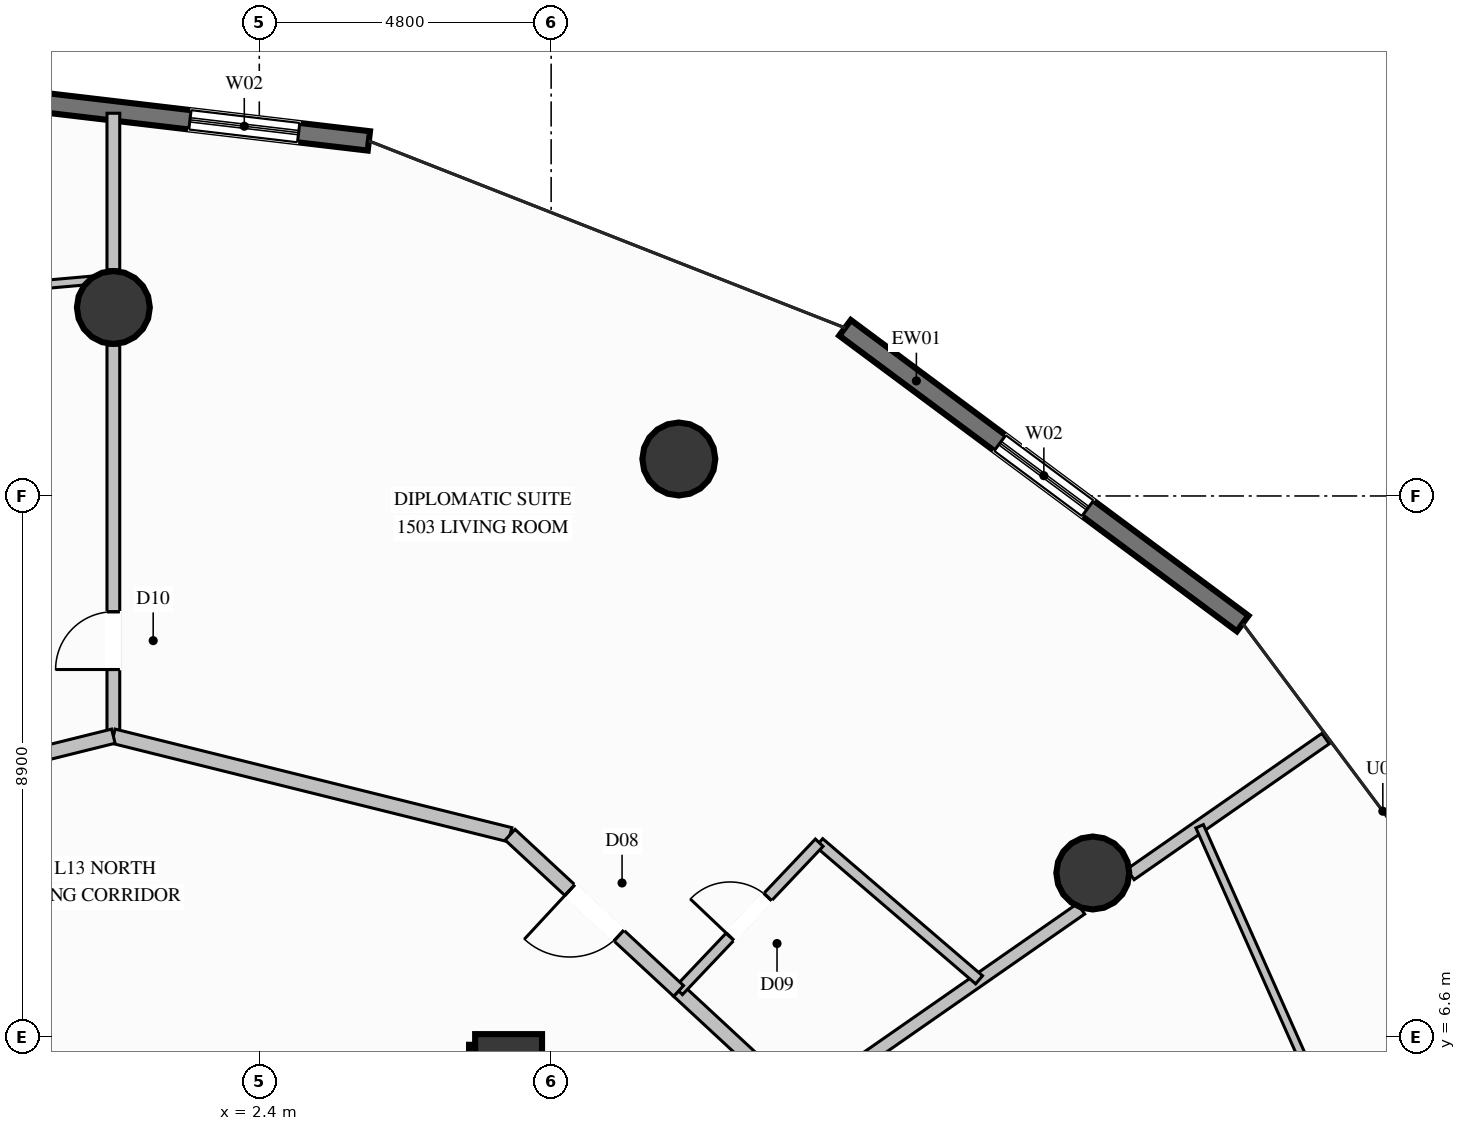
"""IFC4 building model, lengths in metres.
Left out: names, types, materials, properties, quantities, classifications, styles, units other than length and angle.
Written with IfcOpenShell. Run it as: python <this file> out.ifc"""

import sys

from ifc_helpers import new_model, si_unit, direction, frame, frame_2d, origin, origin_2d, place, context, subcontext, project, spatial, rectangle, circle, extrude, element, fill, save


model = new_model("IFC4")
c1 = context("Model", 3, precision=1e-05, world=origin(), true_north=direction((0.0, 1.0)))
c2 = subcontext(c1, "Body", "Model", "MODEL_VIEW")
j1 = project(units=[si_unit("LENGTHUNIT", "METRE"), si_unit("PLANEANGLEUNIT", "RADIAN")], contexts=[c1])
p1 = place(None, origin())
s1 = spatial("IfcSite", under=j1, at=p1, CompositionType="ELEMENT")
p2 = place(p1, origin())
s2 = spatial("IfcBuilding", under=s1, at=p2, CompositionType="ELEMENT")
p3 = place(p2, frame((0.0, 0.0, 57.2)))
s3 = spatial("IfcBuildingStorey", under=s2, at=p3, CompositionType="ELEMENT", Elevation=57.2)
p4 = place(p3, frame((6.5, 6.1, 0.0), z_axis=(0.0, 0.0, 1.0), x_axis=(1.0, 0.0, 0.0)))
e1 = element("IfcColumn", 1, at=p4, inside=s3, PredefinedType="COLUMN", context=c2, shape_type="SweptSolid", body=[
    extrude(rectangle(XDim=1.1, YDim=1.1, at=origin_2d()), origin(), (0.0, 0.0, 1.0), 3.6),
])
p5 = place(p3, frame((5.85, 6.1, 0.0), z_axis=(0.0, 0.0, 1.0), x_axis=(1.0, 0.0, 0.0)))
e2 = element("IfcWall", 2, at=p5, inside=s3, PredefinedType="SHEAR", context=c2, shape_type="SweptSolid", body=[
    extrude(rectangle(XDim=0.275, YDim=0.75, at=frame_2d((0.137, 0.0))), origin(), (0.0, 0.0, 1.0), 3.6),
])
p6 = place(p3, frame((6.5, 3.35, 0.0), z_axis=(0.0, 0.0, 1.0), x_axis=(0.0, 1.0, 0.0)))
e3 = element("IfcWall", 3, at=p6, inside=s3, PredefinedType="SHEAR", context=c2, shape_type="SweptSolid", body=[
    extrude(rectangle(XDim=3.125, YDim=0.75, at=frame_2d((1.562, 0.0))), origin(), (0.0, 0.0, 1.0), 3.6),
])
for number, where, z_axis, x_axis in (
    (4, (16.108, 9.3, 0.0), (0.0, 0.0, 1.0), (1.0, 0.0, 0.0)),
    (5, (9.3, 16.108, 0.0), (0.0, 0.0, 1.0), (1.0, 0.0, 0.0)),
    (6, (0.0, 18.6, 0.0), (0.0, 0.0, 1.0), (1.0, 0.0, 0.0)),
):
    element("IfcColumn", number, at=place(p3, frame(where, z_axis=z_axis, x_axis=x_axis)), inside=s3, PredefinedType="COLUMN", context=c2, shape_type="SweptSolid", body=[
        extrude(circle(Radius=0.6, at=origin_2d()), origin(), (0.0, 0.0, 1.0), 3.6),
    ])
p7 = place(p3, frame((12.033, 18.265, 0.0), z_axis=(0.0, 0.0, 1.0), x_axis=(0.802538106816, -0.596600860801, 0.0)))
e7 = element("IfcWall", 7, at=p7, inside=s3, PredefinedType="SOLIDWALL", context=c2, shape_type="SweptSolid", body=[
    extrude(rectangle(XDim=8.149, YDim=0.32, at=frame_2d((4.075, 0.0))), origin(), (0.0, 0.0, 1.0), 3.34),
])
p8 = place(p7, frame((3.175, 0.0, 0.35)))
e8 = element("IfcOpeningElement", 8, at=p8, cuts=e7, PredefinedType="OPENING", context=c2, shape_type="SweptSolid", body=[
    extrude(rectangle(XDim=1.8, YDim=2.6, at=frame_2d((0.9, 1.3))), frame((0.0, 0.17, 0.0), z_axis=(0.0, -1.0, 0.0), x_axis=(1.0, 0.0, 0.0)), (0.0, 0.0, 1.0), 0.34),
])
p9 = place(p3, frame((-4.153, 22.324, 0.0), z_axis=(0.0, 0.0, 1.0), x_axis=(0.993124034761, -0.117066867986, 0.0)))
e9 = element("IfcWall", 9, at=p9, inside=s3, PredefinedType="SOLIDWALL", context=c2, shape_type="SweptSolid", body=[
    extrude(rectangle(XDim=8.413, YDim=0.32, at=frame_2d((4.207, 0.0))), origin(), (0.0, 0.0, 1.0), 3.34),
])
p10 = place(p9, frame((5.45, 0.0, 0.35)))
e10 = element("IfcOpeningElement", 10, at=p10, cuts=e9, PredefinedType="OPENING", context=c2, shape_type="SweptSolid", body=[
    extrude(rectangle(XDim=1.8, YDim=2.6, at=frame_2d((0.9, 1.3))), frame((0.0, 0.17, 0.0), z_axis=(0.0, -1.0, 0.0), x_axis=(1.0, 0.0, 0.0)), (0.0, 0.0, 1.0), 0.34),
])
p11 = place(p3, frame((11.302, 5.5, 0.0), z_axis=(0.0, 0.0, 1.0), x_axis=(0.82074934999, 0.571288459967, 0.0)))
e11 = element("IfcWall", 11, at=p11, inside=s3, PredefinedType="PARTITIONING", context=c2, shape_type="SweptSolid", body=[
    extrude(rectangle(XDim=5.621, YDim=0.21, at=frame_2d((2.81, 0.0))), origin(), (0.0, 0.0, 1.0), 2.707),
])
p12 = place(p3, frame((16.728, 9.276, 0.0), z_axis=(0.0, 0.0, 1.0), x_axis=(0.820690069196, 0.571373617104, 0.0)))
e12 = element("IfcWall", 12, at=p12, inside=s3, PredefinedType="PARTITIONING", context=c2, shape_type="SweptSolid", body=[
    extrude(rectangle(XDim=3.91, YDim=0.21, at=frame_2d((1.955, 0.0))), origin(), (0.0, 0.0, 1.0), 3.34),
])
p13 = place(p3, frame((0.0, 11.55, 0.0), z_axis=(0.0, 0.0, 1.0), x_axis=(0.0, 1.0, 0.0)))
e13 = element("IfcWall", 13, at=p13, inside=s3, PredefinedType="PARTITIONING", context=c2, shape_type="SweptSolid", body=[
    extrude(rectangle(XDim=6.43, YDim=0.21, at=frame_2d((3.215, 0.0))), origin(), (0.0, 0.0, 1.0), 2.707),
])
p14 = place(p13, frame((1.096, 0.0, 0.0)))
e14 = element("IfcOpeningElement", 14, at=p14, cuts=e13, PredefinedType="OPENING", context=c2, shape_type="SweptSolid", body=[
    extrude(rectangle(XDim=0.95, YDim=2.1, at=frame_2d((0.475, 1.05))), frame((0.0, 0.115, 0.0), z_axis=(0.0, -1.0, 0.0), x_axis=(1.0, 0.0, 0.0)), (0.0, 0.0, 1.0), 0.23),
])
p15 = place(p3, frame((0.0, 19.22, 0.0), z_axis=(0.0, 0.0, 1.0), x_axis=(0.0, 1.0, 0.0)))
e15 = element("IfcWall", 15, at=p15, inside=s3, PredefinedType="PARTITIONING", context=c2, shape_type="SweptSolid", body=[
    extrude(rectangle(XDim=2.574, YDim=0.21, at=frame_2d((1.287, 0.0))), origin(), (0.0, 0.0, 1.0), 3.34),
])
p16 = place(p3, frame((22.4, -0.132, 0.0), z_axis=(0.0, 0.0, 1.0), x_axis=(-0.406250071735, 0.913761937933, 0.0)))
e16 = element("IfcWall", 16, at=p16, inside=s3, PredefinedType="PARTITIONING", context=c2, shape_type="SweptSolid", body=[
    extrude(rectangle(XDim=11.163, YDim=0.135, at=frame_2d((5.582, 0.0))), origin(), (0.0, 0.0, 1.0), 3.34),
])
p17 = place(p16, frame((5.106, 0.0, 0.0)))
e17 = element("IfcOpeningElement", 17, at=p17, cuts=e16, PredefinedType="OPENING", context=c2, shape_type="SweptSolid", body=[
    extrude(rectangle(XDim=0.95, YDim=2.1, at=frame_2d((0.475, 1.05))), frame((0.0, 0.078, 0.0), z_axis=(0.0, -1.0, 0.0), x_axis=(1.0, 0.0, 0.0)), (0.0, 0.0, 1.0), 0.155),
])
p18 = place(p3, frame((11.302, 5.5, 0.0), z_axis=(0.0, 0.0, 1.0), x_axis=(-0.73328595385, 0.679920370254, 0.0)))
e18 = element("IfcWall", 18, at=p18, inside=s3, PredefinedType="PARTITIONING", context=c2, shape_type="SweptSolid", body=[
    extrude(rectangle(XDim=2.736, YDim=0.24, at=frame_2d((1.368, 0.0))), origin(), (0.0, 0.0, 1.0), 3.34),
])
p19 = place(p3, frame((14.238, 7.543, 0.0), z_axis=(0.0, 0.0, 1.0), x_axis=(-0.759032669892, 0.651052537078, 0.0)))
e19 = element("IfcWall", 19, at=p19, inside=s3, PredefinedType="PLUMBINGWALL", context=c2, shape_type="SweptSolid", body=[
    extrude(rectangle(XDim=3.464, YDim=0.175, at=frame_2d((1.732, 0.0))), origin(), (0.0, 0.0, 1.0), 3.34),
])
p20 = place(p3, frame((9.296, 7.36, 0.0), z_axis=(0.0, 0.0, 1.0), x_axis=(0.688264353377, 0.725459978132, 0.0)))
e20 = element("IfcWall", 20, at=p20, inside=s3, PredefinedType="PLUMBINGWALL", context=c2, shape_type="SweptSolid", body=[
    extrude(rectangle(XDim=3.361, YDim=0.175, at=frame_2d((1.68, 0.0))), origin(), (0.0, 0.0, 1.0), 2.707),
])
p21 = place(p20, frame((1.23, 0.0, 0.0)))
e21 = element("IfcOpeningElement", 21, at=p21, cuts=e20, PredefinedType="OPENING", context=c2, shape_type="SweptSolid", body=[
    extrude(rectangle(XDim=0.9, YDim=2.1, at=frame_2d((0.45, 1.05))), frame((0.0, 0.098, 0.0), z_axis=(0.0, -1.0, 0.0), x_axis=(1.0, 0.0, 0.0)), (0.0, 0.0, 1.0), 0.195),
])
p22 = place(p3, frame((6.525, 9.929, 0.0), z_axis=(0.0, 0.0, 1.0), x_axis=(-0.970496047219, 0.241117030365, 0.0)))
e22 = element("IfcWall", 22, at=p22, inside=s3, PredefinedType="PARTITIONING", context=c2, shape_type="SweptSolid", body=[
    extrude(rectangle(XDim=6.723, YDim=0.24, at=frame_2d((3.362, 0.0))), origin(), (0.0, 0.0, 1.0), 2.919),
])
p23 = place(p3, frame((9.296, 7.36, 0.0), z_axis=(0.0, 0.0, 1.0), x_axis=(-0.733350151535, 0.679851127265, 0.0)))
e23 = element("IfcWall", 23, at=p23, inside=s3, PredefinedType="PARTITIONING", context=c2, shape_type="SweptSolid", body=[
    extrude(rectangle(XDim=3.779, YDim=0.24, at=frame_2d((1.889, 0.0))), origin(), (0.0, 0.0, 1.0), 3.34),
])
p24 = place(p23, frame((1.339, 0.0, 0.0)))
e24 = element("IfcOpeningElement", 24, at=p24, cuts=e23, PredefinedType="OPENING", context=c2, shape_type="SweptSolid", body=[
    extrude(rectangle(XDim=1.1, YDim=2.3, at=frame_2d((0.55, 1.15))), frame((0.0, 0.13, 0.0), z_axis=(0.0, -1.0, 0.0), x_axis=(1.0, 0.0, 0.0)), (0.0, 0.0, 1.0), 0.26),
])
p25 = place(p3, frame((0.0, 11.55, 0.0), z_axis=(0.0, 0.0, 1.0), x_axis=(-0.970496047219, -0.241117030365, 0.0)))
e25 = element("IfcWall", 25, at=p25, inside=s3, PredefinedType="PARTITIONING", context=c2, shape_type="SweptSolid", body=[
    extrude(rectangle(XDim=6.723, YDim=0.24, at=frame_2d((3.362, 0.0))), origin(), (0.0, 0.0, 1.0), 2.919),
])
p26 = place(p3, frame((0.0, 19.079, 0.0), z_axis=(0.0, 0.0, 1.0), x_axis=(-0.996115587984, -0.088055297262, 0.0)))
e26 = element("IfcWall", 26, at=p26, inside=s3, PredefinedType="PARTITIONING", context=c2, shape_type="SweptSolid", body=[
    extrude(rectangle(XDim=10.722, YDim=0.135, at=frame_2d((5.361, 0.0))), origin(), (0.0, 0.0, 1.0), 2.792),
])
p27 = place(p26, frame((4.886, 0.0, 0.0)))
e27 = element("IfcOpeningElement", 27, at=p27, cuts=e26, PredefinedType="OPENING", context=c2, shape_type="SweptSolid", body=[
    extrude(rectangle(XDim=0.95, YDim=2.1, at=frame_2d((0.475, 1.05))), frame((0.0, 0.078, 0.0), z_axis=(0.0, -1.0, 0.0), x_axis=(1.0, 0.0, 0.0)), (0.0, 0.0, 1.0), 0.155),
])
p28 = place(p8, origin())
e28 = element("IfcWindow", 28, at=p28, inside=s3, PartitioningType="SINGLE_PANEL", PredefinedType="WINDOW", context=c2, shape_type="SweptSolid", body=[
    extrude(rectangle(XDim=1.8, YDim=2.6, at=frame_2d((0.9, 1.3))), frame((0.0, 0.03, 0.0), z_axis=(0.0, -1.0, 0.0), x_axis=(1.0, 0.0, 0.0)), (0.0, 0.0, 1.0), 0.06),
])
fill(e8, e28)
p29 = place(p10, origin())
e29 = element("IfcWindow", 29, at=p29, inside=s3, PartitioningType="SINGLE_PANEL", PredefinedType="WINDOW", context=c2, shape_type="SweptSolid", body=[
    extrude(rectangle(XDim=1.8, YDim=2.6, at=frame_2d((0.9, 1.3))), frame((0.0, 0.03, 0.0), z_axis=(0.0, -1.0, 0.0), x_axis=(1.0, 0.0, 0.0)), (0.0, 0.0, 1.0), 0.06),
])
fill(e10, e29)
p30 = place(p21, origin())
e30 = element("IfcDoor", 30, at=p30, inside=s3, OperationType="SINGLE_SWING_LEFT", PredefinedType="DOOR", context=c2, shape_type="SweptSolid", body=[
    extrude(rectangle(XDim=0.9, YDim=2.1, at=frame_2d((0.45, 1.05))), frame((0.0, 0.025, 0.0), z_axis=(0.0, -1.0, 0.0), x_axis=(1.0, 0.0, 0.0)), (0.0, 0.0, 1.0), 0.05),
])
fill(e21, e30)
p31 = place(p24, origin())
e31 = element("IfcDoor", 31, at=p31, inside=s3, OperationType="SINGLE_SWING_RIGHT", PredefinedType="DOOR", context=c2, shape_type="SweptSolid", body=[
    extrude(rectangle(XDim=1.1, YDim=2.3, at=frame_2d((0.55, 1.15))), frame((0.0, 0.025, 0.0), z_axis=(0.0, -1.0, 0.0), x_axis=(1.0, 0.0, 0.0)), (0.0, 0.0, 1.0), 0.05),
])
fill(e24, e31)
p32 = place(p14, origin())
e32 = element("IfcDoor", 32, at=p32, inside=s3, OperationType="SINGLE_SWING_LEFT", PredefinedType="DOOR", context=c2, shape_type="SweptSolid", body=[
    extrude(rectangle(XDim=0.95, YDim=2.1, at=frame_2d((0.475, 1.05))), frame((0.0, 0.025, 0.0), z_axis=(0.0, -1.0, 0.0), x_axis=(1.0, 0.0, 0.0)), (0.0, 0.0, 1.0), 0.05),
])
fill(e14, e32)
save(model, sys.argv[1])
